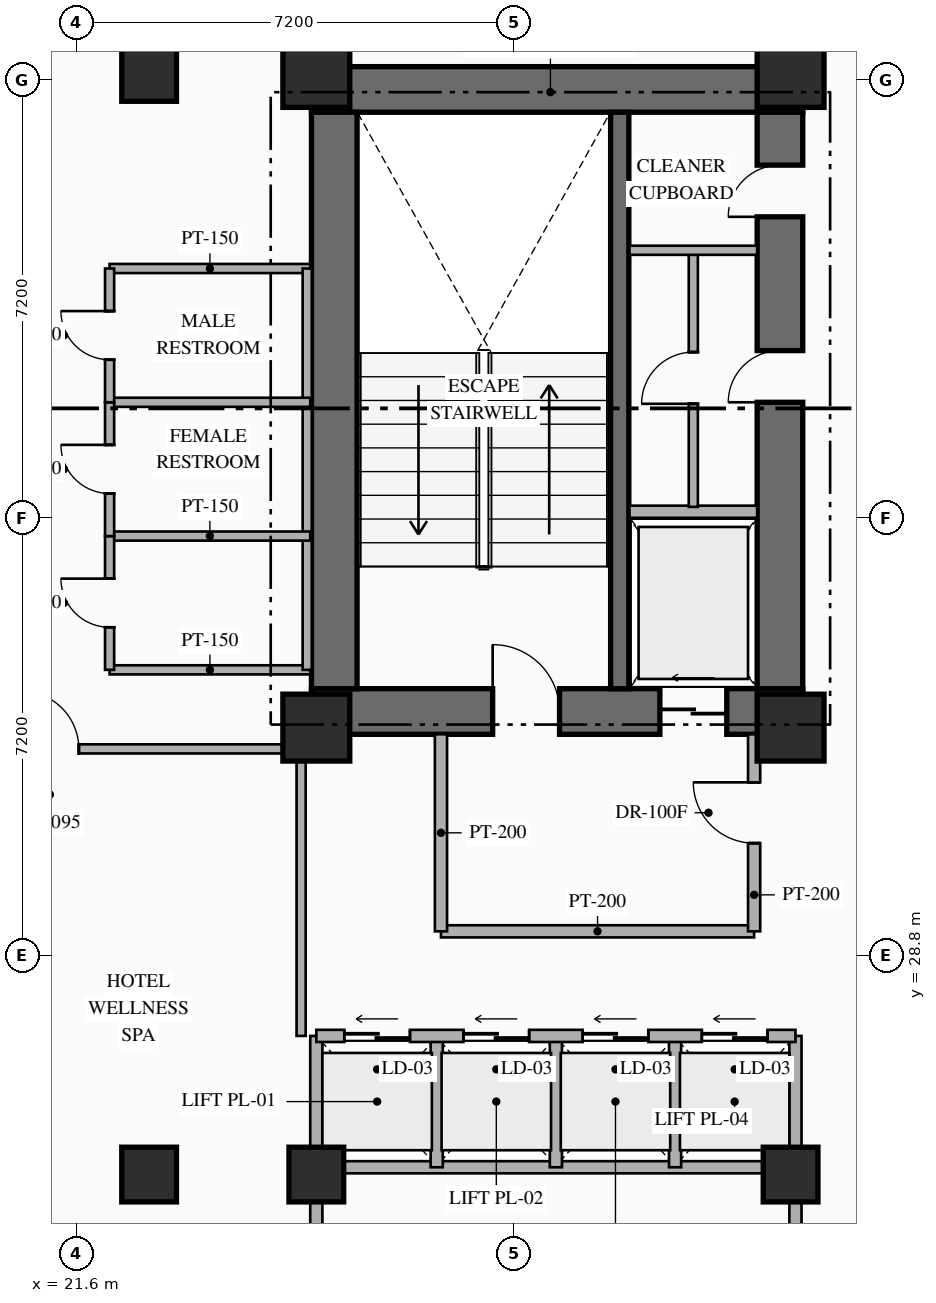
"""IFC4 building model, lengths in metres.
Left out: names, types, materials, properties, quantities, classifications, styles, units other than length and angle.
Written with IfcOpenShell. Run it as: python <this file> out.ifc"""

import sys

from ifc_helpers import new_model, si_unit, direction, frame, frame_2d, origin, origin_2d, place, context, subcontext, project, spatial, rectangle, hollow_rectangle, extrude, element, fill, save


model = new_model("IFC4")
c1 = context("Model", 3, precision=1e-05, world=origin(), true_north=direction((0.0, 1.0)))
c2 = subcontext(c1, "Body", "Model", "MODEL_VIEW")
j1 = project(units=[si_unit("LENGTHUNIT", "METRE"), si_unit("PLANEANGLEUNIT", "RADIAN")], contexts=[c1])
p1 = place(None, origin())
s1 = spatial("IfcSite", under=j1, at=p1, CompositionType="ELEMENT")
p2 = place(p1, origin())
s2 = spatial("IfcBuilding", under=s1, at=p2, CompositionType="ELEMENT")
p3 = place(p2, frame((0.0, 0.0, 74.6)))
s3 = spatial("IfcBuildingStorey", under=s2, at=p3, CompositionType="ELEMENT", Elevation=74.6)
p4 = place(p3, frame((25.47, 32.815, 0.0), z_axis=(0.0, 0.0, 1.0), x_axis=(1.0, 0.0, 0.0)))
e1 = element("IfcWall", 1, at=p4, inside=s3, PredefinedType="SHEAR", context=c2, shape_type="SweptSolid", body=[
    extrude(rectangle(XDim=8.08, YDim=0.75, at=frame_2d((4.04, 0.0))), origin(), (0.0, 0.0, 1.0), 3.35),
])
p5 = place(p4, frame((2.98, 0.0, 0.0)))
e2 = element("IfcOpeningElement", 2, at=p5, cuts=e1, PredefinedType="OPENING", context=c2, shape_type="SweptSolid", body=[
    extrude(rectangle(XDim=1.1, YDim=2.2, at=frame_2d((0.55, 1.1))), frame((0.0, 0.385, 0.0), z_axis=(0.0, -1.0, 0.0), x_axis=(1.0, 0.0, 0.0)), (0.0, 0.0, 1.0), 0.77),
])
p6 = place(p4, frame((5.73, 0.0, 0.0)))
e3 = element("IfcOpeningElement", 3, at=p6, cuts=e1, PredefinedType="OPENING", context=c2, shape_type="SweptSolid", body=[
    extrude(rectangle(XDim=1.1, YDim=2.15, at=frame_2d((0.55, 1.075))), frame((0.0, 0.385, 0.0), z_axis=(0.0, -1.0, 0.0), x_axis=(1.0, 0.0, 0.0)), (0.0, 0.0, 1.0), 0.77),
])
p7 = place(p3, frame((25.47, 43.045, 0.0), z_axis=(0.0, 0.0, 1.0), x_axis=(1.0, 0.0, 0.0)))
e4 = element("IfcWall", 4, at=p7, inside=s3, PredefinedType="SHEAR", context=c2, shape_type="SweptSolid", body=[
    extrude(rectangle(XDim=8.08, YDim=0.75, at=frame_2d((4.04, 0.0))), origin(), (0.0, 0.0, 1.0), 3.35),
])
p8 = place(p3, frame((25.845, 33.19, 0.0), z_axis=(0.0, 0.0, 1.0), x_axis=(0.0, 1.0, 0.0)))
e5 = element("IfcWall", 5, at=p8, inside=s3, PredefinedType="SHEAR", context=c2, shape_type="SweptSolid", body=[
    extrude(rectangle(XDim=9.48, YDim=0.75, at=frame_2d((4.74, 0.0))), origin(), (0.0, 0.0, 1.0), 3.35),
])
p9 = place(p3, frame((33.175, 33.19, 0.0), z_axis=(0.0, 0.0, 1.0), x_axis=(0.0, 1.0, 0.0)))
e6 = element("IfcWall", 6, at=p9, inside=s3, PredefinedType="SHEAR", context=c2, shape_type="SweptSolid", body=[
    extrude(rectangle(XDim=9.48, YDim=0.75, at=frame_2d((4.74, 0.0))), origin(), (0.0, 0.0, 1.0), 3.35),
])
p10 = place(p9, frame((4.71, 0.0, 0.0)))
e7 = element("IfcOpeningElement", 7, at=p10, cuts=e6, PredefinedType="OPENING", context=c2, shape_type="SweptSolid", body=[
    extrude(rectangle(XDim=0.85, YDim=2.08, at=frame_2d((0.425, 1.04))), frame((0.0, 0.385, 0.0), z_axis=(0.0, -1.0, 0.0), x_axis=(1.0, 0.0, 0.0)), (0.0, 0.0, 1.0), 0.77),
])
p11 = place(p9, frame((7.76, 0.0, 0.0)))
e8 = element("IfcOpeningElement", 8, at=p11, cuts=e6, PredefinedType="OPENING", context=c2, shape_type="SweptSolid", body=[
    extrude(rectangle(XDim=0.85, YDim=2.08, at=frame_2d((0.425, 1.04))), frame((0.0, 0.385, 0.0), z_axis=(0.0, -1.0, 0.0), x_axis=(1.0, 0.0, 0.0)), (0.0, 0.0, 1.0), 0.77),
])
p12 = place(p3, frame((30.54, 33.19, 0.0), z_axis=(0.0, 0.0, 1.0), x_axis=(0.0, 1.0, 0.0)))
e9 = element("IfcWall", 9, at=p12, inside=s3, PredefinedType="SHEAR", context=c2, shape_type="SweptSolid", body=[
    extrude(rectangle(XDim=9.48, YDim=0.3, at=frame_2d((4.74, 0.0))), origin(), (0.0, 0.0, 1.0), 3.35),
])
for number, where, z_axis, x_axis in (
    (10, (25.55, 32.55, 0.0), (0.0, 0.0, 1.0), (1.0, 0.0, 0.0)),
    (11, (33.35, 32.55, 0.0), (0.0, 0.0, 1.0), (1.0, 0.0, 0.0)),
    (12, (25.55, 43.3, 0.0), (0.0, 0.0, 1.0), (1.0, 0.0, 0.0)),
    (13, (33.35, 43.3, 0.0), (0.0, 0.0, 1.0), (1.0, 0.0, 0.0)),
):
    element("IfcColumn", number, at=place(p3, frame(where, z_axis=z_axis, x_axis=x_axis)), inside=s3, PredefinedType="COLUMN", context=c2, shape_type="SweptSolid", body=[
        extrude(rectangle(XDim=1.1, YDim=1.1, at=origin_2d()), origin(), (0.0, 0.0, 1.0), 3.35),
    ])
for number, where, z_axis, x_axis in (
    (14, (25.55, 25.2, 0.0), (0.0, 0.0, 1.0), (1.0, 0.0, 0.0)),
    (15, (33.35, 25.2, 0.0), (0.0, 0.0, 1.0), (1.0, 0.0, 0.0)),
    (16, (22.8, 25.2, 0.0), (0.0, 0.0, 1.0), (1.0, 0.0, 0.0)),
    (17, (22.8, 43.3, 0.0), (0.0, 0.0, 1.0), (1.0, 0.0, 0.0)),
):
    element("IfcColumn", number, at=place(p3, frame(where, z_axis=z_axis, x_axis=x_axis)), inside=s3, PredefinedType="COLUMN", context=c2, shape_type="SweptSolid", body=[
        extrude(hollow_rectangle(XDim=0.9, YDim=0.9, WallThickness=0.036, at=origin_2d()), origin(), (0.0, 0.0, 1.0), 3.35),
    ])
p13 = place(p3, frame((30.7, 36.1, 0.0), z_axis=(0.0, 0.0, 1.0), x_axis=(1.0, 0.0, 0.0)))
e18 = element("IfcWall", 18, at=p13, inside=s3, PredefinedType="STANDARD", context=c2, shape_type="SweptSolid", body=[
    extrude(rectangle(XDim=2.1, YDim=0.2, at=frame_2d((1.05, 0.0))), origin(), (0.0, 0.0, 1.0), 3.13),
])
p14 = place(p3, frame((31.75, 36.18, 0.0), z_axis=(0.0, 0.0, 1.0), x_axis=(0.0, 1.0, 0.0)))
e19 = element("IfcWall", 19, at=p14, inside=s3, PredefinedType="PARTITIONING", context=c2, shape_type="SweptSolid", body=[
    extrude(rectangle(XDim=4.24, YDim=0.15, at=frame_2d((2.12, 0.0))), origin(), (0.0, 0.0, 1.0), 3.13),
])
p15 = place(p14, frame((1.695, 0.0, 0.0)))
e20 = element("IfcOpeningElement", 20, at=p15, cuts=e19, PredefinedType="OPENING", context=c2, shape_type="SweptSolid", body=[
    extrude(rectangle(XDim=0.85, YDim=2.08, at=frame_2d((0.425, 1.04))), frame((0.0, 0.085, 0.0), z_axis=(0.0, -1.0, 0.0), x_axis=(1.0, 0.0, 0.0)), (0.0, 0.0, 1.0), 0.17),
])
p16 = place(p3, frame((30.7, 40.4, 0.0), z_axis=(0.0, 0.0, 1.0), x_axis=(1.0, 0.0, 0.0)))
e21 = element("IfcWall", 21, at=p16, inside=s3, PredefinedType="PARTITIONING", context=c2, shape_type="SweptSolid", body=[
    extrude(rectangle(XDim=2.1, YDim=0.15, at=frame_2d((1.05, 0.0))), origin(), (0.0, 0.0, 1.0), 3.13),
])
p17 = place(p3, frame((27.6, 29.2, 0.0), z_axis=(0.0, 0.0, 1.0), x_axis=(1.0, 0.0, 0.0)))
e22 = element("IfcWall", 22, at=p17, inside=s3, PredefinedType="STANDARD", context=c2, shape_type="SweptSolid", body=[
    extrude(rectangle(XDim=5.15, YDim=0.2, at=frame_2d((2.575, 0.0))), origin(), (0.0, 0.0, 1.0), 3.13),
])
p18 = place(p3, frame((27.6, 29.2, 0.0), z_axis=(0.0, 0.0, 1.0), x_axis=(0.0, 1.0, 0.0)))
e23 = element("IfcWall", 23, at=p18, inside=s3, PredefinedType="STANDARD", context=c2, shape_type="SweptSolid", body=[
    extrude(rectangle(XDim=3.24, YDim=0.2, at=frame_2d((1.62, 0.0))), origin(), (0.0, 0.0, 1.0), 3.13),
])
p19 = place(p3, frame((32.75, 29.2, 0.0), z_axis=(0.0, 0.0, 1.0), x_axis=(0.0, 1.0, 0.0)))
e24 = element("IfcWall", 24, at=p19, inside=s3, PredefinedType="STANDARD", context=c2, shape_type="SweptSolid", body=[
    extrude(rectangle(XDim=3.24, YDim=0.2, at=frame_2d((1.62, 0.0))), origin(), (0.0, 0.0, 1.0), 3.13),
])
p20 = place(p19, frame((1.45, 0.0, 0.0)))
e25 = element("IfcOpeningElement", 25, at=p20, cuts=e24, PredefinedType="OPENING", context=c2, shape_type="SweptSolid", body=[
    extrude(rectangle(XDim=1.0, YDim=2.2, at=frame_2d((0.5, 1.1))), frame((0.0, 0.11, 0.0), z_axis=(0.0, -1.0, 0.0), x_axis=(1.0, 0.0, 0.0)), (0.0, 0.0, 1.0), 0.22),
])
for number, where, z_axis, x_axis in (
    (26, (25.55, 23.4, 0.0), (0.0, 0.0, 1.0), (0.0, 1.0, 0.0)),
    (27, (33.43, 23.4, 0.0), (0.0, 0.0, 1.0), (0.0, 1.0, 0.0)),
):
    element("IfcWall", number, at=place(p3, frame(where, z_axis=z_axis, x_axis=x_axis)), inside=s3, PredefinedType="STANDARD", context=c2, shape_type="SweptSolid", body=[
        extrude(rectangle(XDim=4.08, YDim=0.2, at=frame_2d((2.04, 0.0))), origin(), (0.0, 0.0, 1.0), 2.425),
    ])
p21 = place(p3, frame((25.55, 25.32, 0.0), z_axis=(0.0, 0.0, 1.0), x_axis=(1.0, 0.0, 0.0)))
e28 = element("IfcWall", 28, at=p21, inside=s3, PredefinedType="STANDARD", context=c2, shape_type="SweptSolid", body=[
    extrude(rectangle(XDim=7.88, YDim=0.2, at=frame_2d((3.94, 0.0))), origin(), (0.0, 0.0, 1.0), 2.525),
])
for number, where, z_axis, x_axis in (
    (29, (27.53, 25.32, 0.0), (0.0, 0.0, 1.0), (0.0, 1.0, 0.0)),
    (30, (29.49, 25.32, 0.0), (0.0, 0.0, 1.0), (0.0, 1.0, 0.0)),
    (31, (31.45, 25.32, 0.0), (0.0, 0.0, 1.0), (0.0, 1.0, 0.0)),
):
    element("IfcWall", number, at=place(p3, frame(where, z_axis=z_axis, x_axis=x_axis)), inside=s3, PredefinedType="STANDARD", context=c2, shape_type="SweptSolid", body=[
        extrude(rectangle(XDim=2.16, YDim=0.2, at=frame_2d((1.08, 0.0))), origin(), (0.0, 0.0, 1.0), 3.13),
    ])
p22 = place(p3, frame((25.55, 27.48, 0.0), z_axis=(0.0, 0.0, 1.0), x_axis=(1.0, 0.0, 0.0)))
e32 = element("IfcWall", 32, at=p22, inside=s3, PredefinedType="STANDARD", context=c2, shape_type="SweptSolid", body=[
    extrude(rectangle(XDim=7.88, YDim=0.2, at=frame_2d((3.94, 0.0))), origin(), (0.0, 0.0, 1.0), 3.13),
])
p23 = place(p22, frame((0.46, 0.0, 0.0)))
e33 = element("IfcOpeningElement", 33, at=p23, cuts=e32, PredefinedType="OPENING", context=c2, shape_type="SweptSolid", body=[
    extrude(rectangle(XDim=1.08, YDim=2.15, at=frame_2d((0.54, 1.075))), frame((0.0, 0.11, 0.0), z_axis=(0.0, -1.0, 0.0), x_axis=(1.0, 0.0, 0.0)), (0.0, 0.0, 1.0), 0.22),
])
p24 = place(p22, frame((2.42, 0.0, 0.0)))
e34 = element("IfcOpeningElement", 34, at=p24, cuts=e32, PredefinedType="OPENING", context=c2, shape_type="SweptSolid", body=[
    extrude(rectangle(XDim=1.08, YDim=2.15, at=frame_2d((0.54, 1.075))), frame((0.0, 0.11, 0.0), z_axis=(0.0, -1.0, 0.0), x_axis=(1.0, 0.0, 0.0)), (0.0, 0.0, 1.0), 0.22),
])
p25 = place(p22, frame((4.38, 0.0, 0.0)))
e35 = element("IfcOpeningElement", 35, at=p25, cuts=e32, PredefinedType="OPENING", context=c2, shape_type="SweptSolid", body=[
    extrude(rectangle(XDim=1.08, YDim=2.15, at=frame_2d((0.54, 1.075))), frame((0.0, 0.11, 0.0), z_axis=(0.0, -1.0, 0.0), x_axis=(1.0, 0.0, 0.0)), (0.0, 0.0, 1.0), 0.22),
])
p26 = place(p22, frame((6.34, 0.0, 0.0)))
e36 = element("IfcOpeningElement", 36, at=p26, cuts=e32, PredefinedType="OPENING", context=c2, shape_type="SweptSolid", body=[
    extrude(rectangle(XDim=1.08, YDim=2.15, at=frame_2d((0.54, 1.075))), frame((0.0, 0.11, 0.0), z_axis=(0.0, -1.0, 0.0), x_axis=(1.0, 0.0, 0.0)), (0.0, 0.0, 1.0), 0.22),
])
for number, where, z_axis, x_axis in (
    (37, (22.15, 33.5, 0.0), (0.0, 0.0, 1.0), (1.0, 0.0, 0.0)),
    (38, (22.15, 40.1, 0.0), (0.0, 0.0, 1.0), (1.0, 0.0, 0.0)),
):
    element("IfcWall", number, at=place(p3, frame(where, z_axis=z_axis, x_axis=x_axis)), inside=s3, PredefinedType="PARTITIONING", context=c2, shape_type="SweptSolid", body=[
        extrude(rectangle(XDim=3.3, YDim=0.15, at=frame_2d((1.65, 0.0))), origin(), (0.0, 0.0, 1.0), 3.13),
    ])
p27 = place(p3, frame((25.4, 33.5, 0.0), z_axis=(0.0, 0.0, 1.0), x_axis=(0.0, 1.0, 0.0)))
e39 = element("IfcWall", 39, at=p27, inside=s3, PredefinedType="PARTITIONING", context=c2, shape_type="SweptSolid", body=[
    extrude(rectangle(XDim=6.6, YDim=0.15, at=frame_2d((3.3, 0.0))), origin(), (0.0, 0.0, 1.0), 3.13),
])
for number, where, z_axis, x_axis in (
    (40, (22.15, 35.7, 0.0), (0.0, 0.0, 1.0), (1.0, 0.0, 0.0)),
    (41, (22.15, 37.9, 0.0), (0.0, 0.0, 1.0), (1.0, 0.0, 0.0)),
):
    element("IfcWall", number, at=place(p3, frame(where, z_axis=z_axis, x_axis=x_axis)), inside=s3, PredefinedType="PARTITIONING", context=c2, shape_type="SweptSolid", body=[
        extrude(rectangle(XDim=3.3, YDim=0.15, at=frame_2d((1.65, 0.0))), origin(), (0.0, 0.0, 1.0), 3.13),
    ])
p28 = place(p3, frame((22.15, 33.5, 0.0), z_axis=(0.0, 0.0, 1.0), x_axis=(0.0, 1.0, 0.0)))
e42 = element("IfcWall", 42, at=p28, inside=s3, PredefinedType="PARTITIONING", context=c2, shape_type="SweptSolid", body=[
    extrude(rectangle(XDim=2.2, YDim=0.15, at=frame_2d((1.1, 0.0))), origin(), (0.0, 0.0, 1.0), 3.13),
])
p29 = place(p28, frame((0.7, 0.0, 0.0)))
e43 = element("IfcOpeningElement", 43, at=p29, cuts=e42, PredefinedType="OPENING", context=c2, shape_type="SweptSolid", body=[
    extrude(rectangle(XDim=0.8, YDim=2.06, at=frame_2d((0.4, 1.03))), frame((0.0, 0.085, 0.0), z_axis=(0.0, -1.0, 0.0), x_axis=(1.0, 0.0, 0.0)), (0.0, 0.0, 1.0), 0.17),
])
p30 = place(p3, frame((22.15, 35.7, 0.0), z_axis=(0.0, 0.0, 1.0), x_axis=(0.0, 1.0, 0.0)))
e44 = element("IfcWall", 44, at=p30, inside=s3, PredefinedType="PARTITIONING", context=c2, shape_type="SweptSolid", body=[
    extrude(rectangle(XDim=2.2, YDim=0.15, at=frame_2d((1.1, 0.0))), origin(), (0.0, 0.0, 1.0), 3.13),
])
p31 = place(p30, frame((0.7, 0.0, 0.0)))
e45 = element("IfcOpeningElement", 45, at=p31, cuts=e44, PredefinedType="OPENING", context=c2, shape_type="SweptSolid", body=[
    extrude(rectangle(XDim=0.8, YDim=2.06, at=frame_2d((0.4, 1.03))), frame((0.0, 0.085, 0.0), z_axis=(0.0, -1.0, 0.0), x_axis=(1.0, 0.0, 0.0)), (0.0, 0.0, 1.0), 0.17),
])
p32 = place(p3, frame((22.15, 37.9, 0.0), z_axis=(0.0, 0.0, 1.0), x_axis=(0.0, 1.0, 0.0)))
e46 = element("IfcWall", 46, at=p32, inside=s3, PredefinedType="PARTITIONING", context=c2, shape_type="SweptSolid", body=[
    extrude(rectangle(XDim=2.2, YDim=0.15, at=frame_2d((1.1, 0.0))), origin(), (0.0, 0.0, 1.0), 3.13),
])
p33 = place(p32, frame((0.7, 0.0, 0.0)))
e47 = element("IfcOpeningElement", 47, at=p33, cuts=e46, PredefinedType="OPENING", context=c2, shape_type="SweptSolid", body=[
    extrude(rectangle(XDim=0.8, YDim=2.06, at=frame_2d((0.4, 1.03))), frame((0.0, 0.085, 0.0), z_axis=(0.0, -1.0, 0.0), x_axis=(1.0, 0.0, 0.0)), (0.0, 0.0, 1.0), 0.17),
])
p34 = place(p3, frame((33.384, 17.312, 0.0), z_axis=(0.0, 0.0, 1.0), x_axis=(0.600008743659, 0.799993442181, 0.0)))
e48 = element("IfcWall", 48, at=p34, inside=s3, PredefinedType="PARTITIONING", context=c2, shape_type="SweptSolid", body=[
    extrude(rectangle(XDim=8.935, YDim=0.15, at=frame_2d((4.468, 0.0))), origin(), (0.0, 0.0, 1.0), 3.13),
])
p35 = place(p3, frame((19.95, 32.2, 0.0), z_axis=(0.0, 0.0, 1.0), x_axis=(1.0, 0.0, 0.0)))
e49 = element("IfcWall", 49, at=p35, inside=s3, PredefinedType="PARTITIONING", context=c2, shape_type="SweptSolid", body=[
    extrude(rectangle(XDim=5.35, YDim=0.15, at=frame_2d((2.675, 0.0))), origin(), (0.0, 0.0, 1.0), 3.13),
])
p36 = place(p35, frame((0.744, 0.0, 0.0)))
e50 = element("IfcOpeningElement", 50, at=p36, cuts=e49, PredefinedType="OPENING", context=c2, shape_type="SweptSolid", body=[
    extrude(rectangle(XDim=0.95, YDim=2.15, at=frame_2d((0.475, 1.075))), frame((0.0, 0.085, 0.0), z_axis=(0.0, -1.0, 0.0), x_axis=(1.0, 0.0, 0.0)), (0.0, 0.0, 1.0), 0.17),
])
p37 = place(p3, frame((25.3, 27.48, 0.0), z_axis=(0.0, 0.0, 1.0), x_axis=(0.0, 1.0, 0.0)))
e51 = element("IfcWall", 51, at=p37, inside=s3, PredefinedType="PARTITIONING", context=c2, shape_type="SweptSolid", body=[
    extrude(rectangle(XDim=4.72, YDim=0.15, at=frame_2d((2.36, 0.0))), origin(), (0.0, 0.0, 1.0), 2.425),
])
p38 = place(p5, origin())
e52 = element("IfcDoor", 52, at=p38, inside=s3, OperationType="SINGLE_SWING_LEFT", PredefinedType="DOOR", context=c2, shape_type="SweptSolid", body=[
    extrude(rectangle(XDim=1.1, YDim=2.2, at=frame_2d((0.55, 1.1))), frame((0.0, 0.025, 0.0), z_axis=(0.0, -1.0, 0.0), x_axis=(1.0, 0.0, 0.0)), (0.0, 0.0, 1.0), 0.05),
])
fill(e2, e52)
p39 = place(p6, origin())
e53 = element("IfcDoor", 53, at=p39, inside=s3, OperationType="SLIDING_TO_LEFT", PredefinedType="USERDEFINED", context=c2, shape_type="SweptSolid", body=[
    extrude(rectangle(XDim=1.1, YDim=2.15, at=frame_2d((0.55, 1.075))), frame((0.0, 0.025, 0.0), z_axis=(0.0, -1.0, 0.0), x_axis=(1.0, 0.0, 0.0)), (0.0, 0.0, 1.0), 0.05),
])
fill(e3, e53)
p40 = place(p10, origin())
e54 = element("IfcDoor", 54, at=p40, inside=s3, OperationType="SINGLE_SWING_LEFT", PredefinedType="DOOR", context=c2, shape_type="SweptSolid", body=[
    extrude(rectangle(XDim=0.85, YDim=2.08, at=frame_2d((0.425, 1.04))), frame((0.0, 0.025, 0.0), z_axis=(0.0, -1.0, 0.0), x_axis=(1.0, 0.0, 0.0)), (0.0, 0.0, 1.0), 0.05),
])
fill(e7, e54)
p41 = place(p11, origin())
e55 = element("IfcDoor", 55, at=p41, inside=s3, OperationType="SINGLE_SWING_LEFT", PredefinedType="DOOR", context=c2, shape_type="SweptSolid", body=[
    extrude(rectangle(XDim=0.85, YDim=2.08, at=frame_2d((0.425, 1.04))), frame((0.0, 0.025, 0.0), z_axis=(0.0, -1.0, 0.0), x_axis=(1.0, 0.0, 0.0)), (0.0, 0.0, 1.0), 0.05),
])
fill(e8, e55)
p42 = place(p15, origin())
e56 = element("IfcDoor", 56, at=p42, inside=s3, OperationType="SINGLE_SWING_LEFT", PredefinedType="DOOR", context=c2, shape_type="SweptSolid", body=[
    extrude(rectangle(XDim=0.85, YDim=2.08, at=frame_2d((0.425, 1.04))), frame((0.0, 0.025, 0.0), z_axis=(0.0, -1.0, 0.0), x_axis=(1.0, 0.0, 0.0)), (0.0, 0.0, 1.0), 0.05),
])
fill(e20, e56)
p43 = place(p20, origin())
e57 = element("IfcDoor", 57, at=p43, inside=s3, OperationType="SINGLE_SWING_RIGHT", PredefinedType="DOOR", context=c2, shape_type="SweptSolid", body=[
    extrude(rectangle(XDim=1.0, YDim=2.2, at=frame_2d((0.5, 1.1))), frame((0.0, 0.025, 0.0), z_axis=(0.0, -1.0, 0.0), x_axis=(1.0, 0.0, 0.0)), (0.0, 0.0, 1.0), 0.05),
])
fill(e25, e57)
p44 = place(p23, origin())
e58 = element("IfcDoor", 58, at=p44, inside=s3, OperationType="SLIDING_TO_LEFT", PredefinedType="USERDEFINED", context=c2, shape_type="SweptSolid", body=[
    extrude(rectangle(XDim=1.08, YDim=2.15, at=frame_2d((0.54, 1.075))), frame((0.0, 0.025, 0.0), z_axis=(0.0, -1.0, 0.0), x_axis=(1.0, 0.0, 0.0)), (0.0, 0.0, 1.0), 0.05),
])
fill(e33, e58)
p45 = place(p24, origin())
e59 = element("IfcDoor", 59, at=p45, inside=s3, OperationType="SLIDING_TO_LEFT", PredefinedType="USERDEFINED", context=c2, shape_type="SweptSolid", body=[
    extrude(rectangle(XDim=1.08, YDim=2.15, at=frame_2d((0.54, 1.075))), frame((0.0, 0.025, 0.0), z_axis=(0.0, -1.0, 0.0), x_axis=(1.0, 0.0, 0.0)), (0.0, 0.0, 1.0), 0.05),
])
fill(e34, e59)
p46 = place(p25, origin())
e60 = element("IfcDoor", 60, at=p46, inside=s3, OperationType="SLIDING_TO_LEFT", PredefinedType="USERDEFINED", context=c2, shape_type="SweptSolid", body=[
    extrude(rectangle(XDim=1.08, YDim=2.15, at=frame_2d((0.54, 1.075))), frame((0.0, 0.025, 0.0), z_axis=(0.0, -1.0, 0.0), x_axis=(1.0, 0.0, 0.0)), (0.0, 0.0, 1.0), 0.05),
])
fill(e35, e60)
p47 = place(p26, origin())
e61 = element("IfcDoor", 61, at=p47, inside=s3, OperationType="SLIDING_TO_LEFT", PredefinedType="USERDEFINED", context=c2, shape_type="SweptSolid", body=[
    extrude(rectangle(XDim=1.08, YDim=2.15, at=frame_2d((0.54, 1.075))), frame((0.0, 0.025, 0.0), z_axis=(0.0, -1.0, 0.0), x_axis=(1.0, 0.0, 0.0)), (0.0, 0.0, 1.0), 0.05),
])
fill(e36, e61)
p48 = place(p29, origin())
e62 = element("IfcDoor", 62, at=p48, inside=s3, OperationType="SINGLE_SWING_RIGHT", PredefinedType="DOOR", context=c2, shape_type="SweptSolid", body=[
    extrude(rectangle(XDim=0.8, YDim=2.06, at=frame_2d((0.4, 1.03))), frame((0.0, 0.025, 0.0), z_axis=(0.0, -1.0, 0.0), x_axis=(1.0, 0.0, 0.0)), (0.0, 0.0, 1.0), 0.05),
])
fill(e43, e62)
p49 = place(p31, origin())
e63 = element("IfcDoor", 63, at=p49, inside=s3, OperationType="SINGLE_SWING_RIGHT", PredefinedType="DOOR", context=c2, shape_type="SweptSolid", body=[
    extrude(rectangle(XDim=0.8, YDim=2.06, at=frame_2d((0.4, 1.03))), frame((0.0, 0.025, 0.0), z_axis=(0.0, -1.0, 0.0), x_axis=(1.0, 0.0, 0.0)), (0.0, 0.0, 1.0), 0.05),
])
fill(e45, e63)
p50 = place(p33, origin())
e64 = element("IfcDoor", 64, at=p50, inside=s3, OperationType="SINGLE_SWING_RIGHT", PredefinedType="DOOR", context=c2, shape_type="SweptSolid", body=[
    extrude(rectangle(XDim=0.8, YDim=2.06, at=frame_2d((0.4, 1.03))), frame((0.0, 0.025, 0.0), z_axis=(0.0, -1.0, 0.0), x_axis=(1.0, 0.0, 0.0)), (0.0, 0.0, 1.0), 0.05),
])
fill(e47, e64)
p51 = place(p36, origin())
e65 = element("IfcDoor", 65, at=p51, inside=s3, OperationType="SINGLE_SWING_LEFT", PredefinedType="DOOR", context=c2, shape_type="SweptSolid", body=[
    extrude(rectangle(XDim=0.95, YDim=2.15, at=frame_2d((0.475, 1.075))), frame((0.0, 0.025, 0.0), z_axis=(0.0, -1.0, 0.0), x_axis=(1.0, 0.0, 0.0)), (0.0, 0.0, 1.0), 0.05),
])
fill(e50, e65)
save(model, sys.argv[1])
